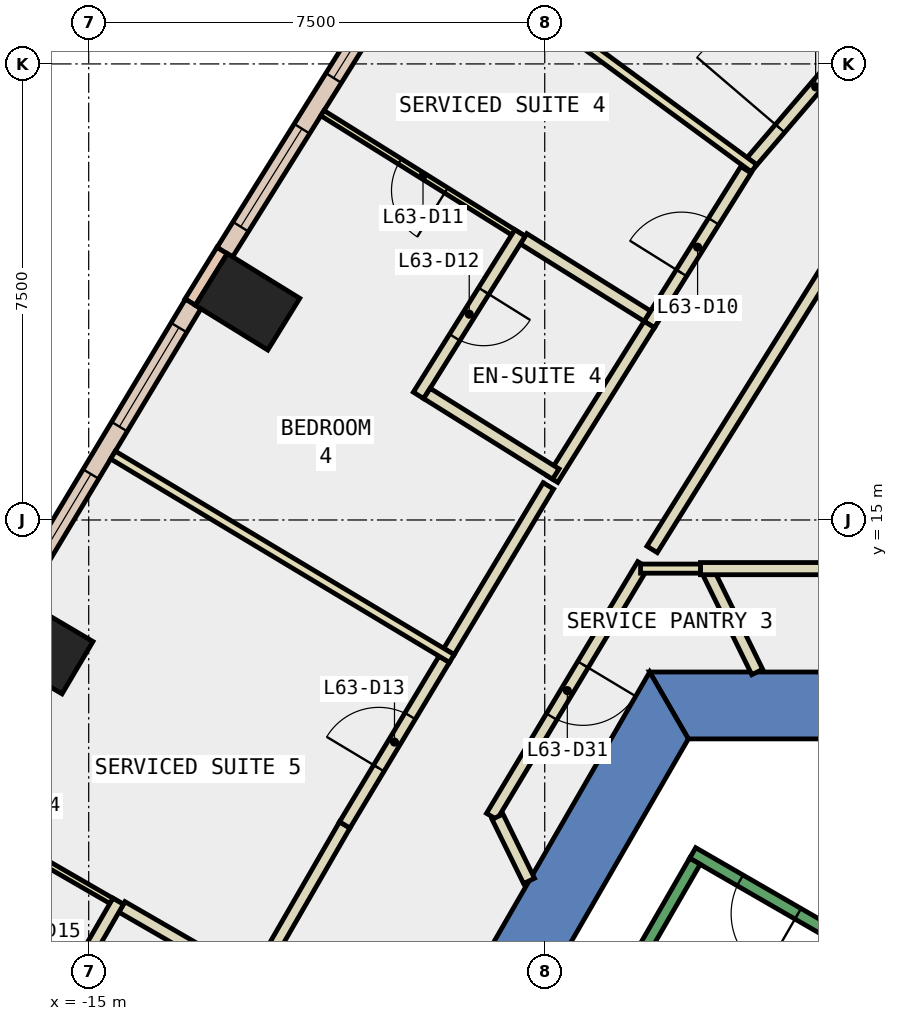
"""IFC4 building model, lengths in metres.
Left out: names, types, materials, properties, quantities, classifications, styles, units other than length and angle.
Written with IfcOpenShell. Run it as: python <this file> out.ifc"""

import sys

from ifc_helpers import new_model, si_unit, direction, frame, frame_2d, origin, origin_2d, place, context, subcontext, project, spatial, polyline, rectangle, outline, extrude, element, fill, save


model = new_model("IFC4")
c1 = context("Model", 3, precision=1e-05, world=origin(), true_north=direction((0.0, 1.0)))
c2 = subcontext(c1, "Body", "Model", "MODEL_VIEW")
j1 = project(units=[si_unit("LENGTHUNIT", "METRE"), si_unit("PLANEANGLEUNIT", "RADIAN")], contexts=[c1])
p1 = place(None, origin())
s1 = spatial("IfcSite", under=j1, at=p1, CompositionType="ELEMENT")
p2 = place(p1, origin())
s2 = spatial("IfcBuilding", under=s1, at=p2, CompositionType="ELEMENT")
p3 = place(p2, frame((0.0, 0.0, 273.8)))
s3 = spatial("IfcBuildingStorey", under=s2, at=p3, CompositionType="ELEMENT", Elevation=273.8)
for number, where, z_axis, x_axis in (
    (1, (-12.387, 18.588, -0.34), (0.0, 0.0, 1.0), (0.526, 0.851, 0.0)),
    (2, (-15.787, 12.927, -0.34), (0.0, 0.0, 1.0), (0.509, 0.861, 0.0)),
):
    element("IfcColumn", number, at=place(p3, frame(where, z_axis=z_axis, x_axis=x_axis)), inside=s3, PredefinedType="COLUMN", context=c2, shape_type="SweptSolid", body=[
        extrude(rectangle(XDim=1.0, YDim=1.4, at=origin_2d()), origin(), (0.0, 0.0, 1.0), 3.6),
    ])
p4 = place(p3, frame((0.0, 0.0, -0.34)))
e3 = element("IfcWall", 3, at=p4, inside=s3, PredefinedType="SHEAR", context=c2, shape_type="SweptSolid", body=[
    extrude(outline(polyline([(5.774, 12.5), (-5.774, 12.5), (-5.138, 11.4), (5.138, 11.4), (5.774, 12.5)])), origin(), (0.0, 0.0, 1.0), 3.6),
])
p5 = place(p3, frame((0.0, 0.0, -0.34)))
e4 = element("IfcWall", 4, at=p5, inside=s3, PredefinedType="SHEAR", context=c2, shape_type="SweptSolid", body=[
    extrude(outline(polyline([(-10.535, 4.253), (-9.583, 3.703), (-5.138, 11.4), (-5.774, 12.5), (-10.535, 4.253)])), origin(), (0.0, 0.0, 1.0), 3.6),
])
p6 = place(p3, frame((-12.805, 19.434, 0.0), z_axis=(0.0, 0.0, 1.0), x_axis=(-0.525825307325, -0.850592585306, 0.0)))
e5 = element("IfcWall", 5, at=p6, inside=s3, PredefinedType="STANDARD", context=c2, shape_type="SweptSolid", body=[
    extrude(rectangle(XDim=1.0, YDim=0.2, at=frame_2d((0.5, 0.0))), origin(), (0.0, 0.0, 1.0), 3.26),
])
p7 = place(p3, frame((-9.704, 24.297, 0.0), z_axis=(0.0, 0.0, 1.0), x_axis=(-0.529915244244, -0.848050608111, 0.0)))
e6 = element("IfcWall", 6, at=p7, inside=s3, PredefinedType="STANDARD", context=c2, shape_type="SweptSolid", body=[
    extrude(rectangle(XDim=5.769, YDim=0.3, at=frame_2d((2.884, 0.0))), origin(), (0.0, 0.0, 1.0), 3.26),
])
p8 = place(p7, frame((0.492, 0.0, 0.9)))
e7 = element("IfcOpeningElement", 7, at=p8, cuts=e6, PredefinedType="OPENING", context=c2, shape_type="SweptSolid", body=[
    extrude(rectangle(XDim=1.9, YDim=2.0, at=frame_2d((0.95, 1.0))), frame((0.0, 0.16, 0.0), z_axis=(0.0, -1.0, 0.0), x_axis=(1.0, 0.0, 0.0)), (0.0, 0.0, 1.0), 0.32),
])
p9 = place(p7, frame((3.376, 0.0, 0.9)))
e8 = element("IfcOpeningElement", 8, at=p9, cuts=e6, PredefinedType="OPENING", context=c2, shape_type="SweptSolid", body=[
    extrude(rectangle(XDim=1.9, YDim=2.0, at=frame_2d((0.95, 1.0))), frame((0.0, 0.16, 0.0), z_axis=(0.0, -1.0, 0.0), x_axis=(1.0, 0.0, 0.0)), (0.0, 0.0, 1.0), 0.32),
])
p10 = place(p3, frame((-13.282, 18.554, 0.0), z_axis=(0.0, 0.0, 1.0), x_axis=(-0.515006791362, -0.857186096977, 0.0)))
e9 = element("IfcWall", 9, at=p10, inside=s3, PredefinedType="STANDARD", context=c2, shape_type="SweptSolid", body=[
    extrude(rectangle(XDim=5.619, YDim=0.3, at=frame_2d((2.81, 0.0))), origin(), (0.0, 0.0, 1.0), 3.26),
])
p11 = place(p10, frame((0.455, 0.0, 0.9)))
e10 = element("IfcOpeningElement", 10, at=p11, cuts=e9, PredefinedType="OPENING", context=c2, shape_type="SweptSolid", body=[
    extrude(rectangle(XDim=1.9, YDim=2.0, at=frame_2d((0.95, 1.0))), frame((0.0, 0.16, 0.0), z_axis=(0.0, -1.0, 0.0), x_axis=(1.0, 0.0, 0.0)), (0.0, 0.0, 1.0), 0.32),
])
p12 = place(p10, frame((3.265, 0.0, 0.9)))
e11 = element("IfcOpeningElement", 11, at=p12, cuts=e9, PredefinedType="OPENING", context=c2, shape_type="SweptSolid", body=[
    extrude(rectangle(XDim=1.9, YDim=2.0, at=frame_2d((0.95, 1.0))), frame((0.0, 0.16, 0.0), z_axis=(0.0, -1.0, 0.0), x_axis=(1.0, 0.0, 0.0)), (0.0, 0.0, 1.0), 0.32),
])
p13 = place(p3, frame((-4.005, 12.5, 0.0), z_axis=(0.0, 0.0, 1.0), x_axis=(-0.440355460167, 0.89782351757, 0.0)))
e12 = element("IfcWall", 12, at=p13, inside=s3, PredefinedType="PARTITIONING", context=c2, shape_type="SweptSolid", body=[
    extrude(rectangle(XDim=1.869, YDim=0.2, at=frame_2d((0.935, 0.0))), origin(), (0.0, 0.0, 1.0), 3.26),
])
p14 = place(p3, frame((-5.885, 14.264, 0.0), z_axis=(0.0, 0.0, 1.0), x_axis=(-0.514971458129, -0.857207324579, 0.0)))
e13 = element("IfcWall", 13, at=p14, inside=s3, PredefinedType="PARTITIONING", context=c2, shape_type="SweptSolid", body=[
    extrude(rectangle(XDim=4.83, YDim=0.2, at=frame_2d((2.415, 0.0))), origin(), (0.0, 0.0, 1.0), 3.26),
])
p15 = place(p14, frame((1.915, 0.0, 0.0)))
e14 = element("IfcOpeningElement", 14, at=p15, cuts=e13, PredefinedType="OPENING", context=c2, shape_type="SweptSolid", body=[
    extrude(rectangle(XDim=1.0, YDim=2.1, at=frame_2d((0.5, 1.05))), frame((0.0, 0.11, 0.0), z_axis=(0.0, -1.0, 0.0), x_axis=(1.0, 0.0, 0.0)), (0.0, 0.0, 1.0), 0.22),
])
p16 = place(p3, frame((-8.276, 10.12, 0.0), z_axis=(0.0, 0.0, 1.0), x_axis=(0.440226122236, -0.897886942382, 0.0)))
e15 = element("IfcWall", 15, at=p16, inside=s3, PredefinedType="PARTITIONING", context=c2, shape_type="SweptSolid", body=[
    extrude(rectangle(XDim=1.176, YDim=0.2, at=frame_2d((0.588, 0.0))), origin(), (0.0, 0.0, 1.0), 3.26),
])
p17 = place(p3, frame((-4.939, 14.2, 0.0), z_axis=(0.0, 0.0, 1.0), x_axis=(1.0, 0.0, 0.0)))
e16 = element("IfcWall", 16, at=p17, inside=s3, PredefinedType="PARTITIONING", context=c2, shape_type="SweptSolid", body=[
    extrude(rectangle(XDim=4.539, YDim=0.2, at=frame_2d((2.27, 0.0))), origin(), (0.0, 0.0, 1.0), 3.26),
])
p18 = place(p3, frame((-2.469, 19.742, 0.0), z_axis=(0.0, 0.0, 1.0), x_axis=(-0.529852912827, -0.848089553508, 0.0)))
e17 = element("IfcWall", 17, at=p18, inside=s3, PredefinedType="PARTITIONING", context=c2, shape_type="SweptSolid", body=[
    extrude(rectangle(XDim=6.162, YDim=0.2, at=frame_2d((3.081, 0.0))), origin(), (0.0, 0.0, 1.0), 3.26),
])
p19 = place(p3, frame((-4.155, 20.825, 0.0), z_axis=(0.0, 0.0, 1.0), x_axis=(0.650396970678, 0.75959448427, 0.0)))
e18 = element("IfcWall", 18, at=p19, inside=s3, PredefinedType="PARTITIONING", context=c2, shape_type="SweptSolid", body=[
    extrude(rectangle(XDim=3.416, YDim=0.2, at=frame_2d((1.708, 0.0))), origin(), (0.0, 0.0, 1.0), 3.26),
])
p20 = place(p19, frame((0.808, 0.0, 0.0)))
e19 = element("IfcOpeningElement", 19, at=p20, cuts=e18, PredefinedType="OPENING", context=c2, shape_type="SweptSolid", body=[
    extrude(rectangle(XDim=1.8, YDim=2.1, at=frame_2d((0.9, 1.05))), frame((0.0, 0.11, 0.0), z_axis=(0.0, -1.0, 0.0), x_axis=(1.0, 0.0, 0.0)), (0.0, 0.0, 1.0), 0.22),
])
p21 = place(p3, frame((-5.781, 18.215, 0.0), z_axis=(0.0, 0.0, 1.0), x_axis=(0.530028199927, 0.847980015851, 0.0)))
e20 = element("IfcWall", 20, at=p21, inside=s3, PredefinedType="PARTITIONING", context=c2, shape_type="SweptSolid", body=[
    extrude(rectangle(XDim=3.0, YDim=0.2, at=frame_2d((1.5, 0.0))), origin(), (0.0, 0.0, 1.0), 3.26),
])
p22 = place(p21, frame((1.0, 0.0, 0.0)))
e21 = element("IfcOpeningElement", 21, at=p22, cuts=e20, PredefinedType="OPENING", context=c2, shape_type="SweptSolid", body=[
    extrude(rectangle(XDim=1.0, YDim=2.1, at=frame_2d((0.5, 1.05))), frame((0.0, 0.11, 0.0), z_axis=(0.0, -1.0, 0.0), x_axis=(1.0, 0.0, 0.0)), (0.0, 0.0, 1.0), 0.22),
])
p23 = place(p3, frame((-9.075, 12.837, 0.0), z_axis=(0.0, 0.0, 1.0), x_axis=(0.514620055475, 0.857418333431, 0.0)))
e22 = element("IfcWall", 22, at=p23, inside=s3, PredefinedType="PARTITIONING", context=c2, shape_type="SweptSolid", body=[
    extrude(rectangle(XDim=3.177, YDim=0.2, at=frame_2d((1.588, 0.0))), origin(), (0.0, 0.0, 1.0), 3.26),
])
p24 = place(p3, frame((-7.371, 15.671, 0.0), z_axis=(0.0, 0.0, 1.0), x_axis=(0.529991625428, 0.84800287557, 0.0)))
e23 = element("IfcWall", 23, at=p24, inside=s3, PredefinedType="PARTITIONING", context=c2, shape_type="SweptSolid", body=[
    extrude(rectangle(XDim=3.0, YDim=0.2, at=frame_2d((1.5, 0.0))), origin(), (0.0, 0.0, 1.0), 3.26),
])
p25 = place(p3, frame((-12.338, 7.3, 0.0), z_axis=(0.0, 0.0, 1.0), x_axis=(0.4996633593, 0.866219676164, 0.0)))
e24 = element("IfcWall", 24, at=p25, inside=s3, PredefinedType="PARTITIONING", context=c2, shape_type="SweptSolid", body=[
    extrude(rectangle(XDim=3.1, YDim=0.2, at=frame_2d((1.55, 0.0))), origin(), (0.0, 0.0, 1.0), 3.26),
])
p26 = place(p3, frame((-10.789, 9.985, 0.0), z_axis=(0.0, 0.0, 1.0), x_axis=(0.51487988517, 0.857262330823, 0.0)))
e25 = element("IfcWall", 25, at=p26, inside=s3, PredefinedType="PARTITIONING", context=c2, shape_type="SweptSolid", body=[
    extrude(rectangle(XDim=3.177, YDim=0.2, at=frame_2d((1.589, 0.0))), origin(), (0.0, 0.0, 1.0), 3.26),
])
p27 = place(p26, frame((1.089, 0.0, 0.0)))
e26 = element("IfcOpeningElement", 26, at=p27, cuts=e25, PredefinedType="OPENING", context=c2, shape_type="SweptSolid", body=[
    extrude(rectangle(XDim=1.0, YDim=2.1, at=frame_2d((0.5, 1.05))), frame((0.0, 0.11, 0.0), z_axis=(0.0, -1.0, 0.0), x_axis=(1.0, 0.0, 0.0)), (0.0, 0.0, 1.0), 0.22),
])
p28 = place(p3, frame((-4.939, 14.2, 0.0), z_axis=(0.0, 0.0, 1.0), x_axis=(-1.0, 0.0, 0.0)))
e27 = element("IfcWall", 27, at=p28, inside=s3, PredefinedType="PARTITIONING", context=c2, shape_type="SweptSolid", body=[
    extrude(rectangle(XDim=0.985, YDim=0.15, at=frame_2d((0.493, 0.0))), origin(), (0.0, 0.0, 1.0), 3.26),
])
p29 = place(p3, frame((-4.058, 20.785, 0.0), z_axis=(0.0, 0.0, 1.0), x_axis=(-0.805947688418, 0.591986759593, 0.0)))
e28 = element("IfcWall", 28, at=p29, inside=s3, PredefinedType="PARTITIONING", context=c2, shape_type="SweptSolid", body=[
    extrude(rectangle(XDim=5.196, YDim=0.15, at=frame_2d((2.598, 0.0))), origin(), (0.0, 0.0, 1.0), 3.26),
])
p30 = place(p3, frame((-7.848, 19.625, 0.0), z_axis=(0.0, 0.0, 1.0), x_axis=(-0.848188150314, 0.529695064794, 0.0)))
e29 = element("IfcWall", 29, at=p30, inside=s3, PredefinedType="PARTITIONING", context=c2, shape_type="SweptSolid", body=[
    extrude(rectangle(XDim=3.9, YDim=0.1, at=frame_2d((1.95, 0.0))), origin(), (0.0, 0.0, 1.0), 3.26),
])
p31 = place(p30, frame((1.5, 0.0, 0.0)))
e30 = element("IfcOpeningElement", 30, at=p31, cuts=e29, PredefinedType="OPENING", context=c2, shape_type="SweptSolid", body=[
    extrude(rectangle(XDim=0.9, YDim=2.1, at=frame_2d((0.45, 1.05))), frame((0.0, 0.06, 0.0), z_axis=(0.0, -1.0, 0.0), x_axis=(1.0, 0.0, 0.0)), (0.0, 0.0, 1.0), 0.12),
])
p32 = place(p3, frame((-5.813, 18.353, 0.0), z_axis=(0.0, 0.0, 1.0), x_axis=(-0.847969725239, 0.530044663287, 0.0)))
e31 = element("IfcWall", 31, at=p32, inside=s3, PredefinedType="PARTITIONING", context=c2, shape_type="SweptSolid", body=[
    extrude(rectangle(XDim=2.4, YDim=0.2, at=frame_2d((1.2, 0.0))), origin(), (0.0, 0.0, 1.0), 3.26),
])
p33 = place(p3, frame((-7.907, 19.72, 0.0), z_axis=(0.0, 0.0, 1.0), x_axis=(-0.529915322147, -0.848050559433, 0.0)))
e32 = element("IfcWall", 32, at=p33, inside=s3, PredefinedType="PARTITIONING", context=c2, shape_type="SweptSolid", body=[
    extrude(rectangle(XDim=3.149, YDim=0.2, at=frame_2d((1.575, 0.0))), origin(), (0.0, 0.0, 1.0), 3.26),
])
p34 = place(p33, frame((1.125, 0.0, 0.0)))
e33 = element("IfcOpeningElement", 33, at=p34, cuts=e32, PredefinedType="OPENING", context=c2, shape_type="SweptSolid", body=[
    extrude(rectangle(XDim=0.9, YDim=2.1, at=frame_2d((0.45, 1.05))), frame((0.0, 0.11, 0.0), z_axis=(0.0, -1.0, 0.0), x_axis=(1.0, 0.0, 0.0)), (0.0, 0.0, 1.0), 0.22),
])
p35 = place(p3, frame((-9.438, 17.081, 0.0), z_axis=(0.0, 0.0, 1.0), x_axis=(0.847992817371, -0.530007718516, 0.0)))
e34 = element("IfcWall", 34, at=p35, inside=s3, PredefinedType="PARTITIONING", context=c2, shape_type="SweptSolid", body=[
    extrude(rectangle(XDim=2.5, YDim=0.2, at=frame_2d((1.25, 0.0))), origin(), (0.0, 0.0, 1.0), 3.26),
])
p36 = place(p3, frame((-9.028, 12.722, 0.0), z_axis=(0.0, 0.0, 1.0), x_axis=(-0.857330501016, 0.514766366449, 0.0)))
e35 = element("IfcWall", 35, at=p36, inside=s3, PredefinedType="PARTITIONING", context=c2, shape_type="SweptSolid", body=[
    extrude(rectangle(XDim=6.5, YDim=0.15, at=frame_2d((3.25, 0.0))), origin(), (0.0, 0.0, 1.0), 3.26),
])
p37 = place(p3, frame((-14.454, 8.637, 0.0), z_axis=(0.0, 0.0, 1.0), x_axis=(-0.865995823051, 0.500051231833, 0.0)))
e36 = element("IfcWall", 36, at=p37, inside=s3, PredefinedType="PARTITIONING", context=c2, shape_type="SweptSolid", body=[
    extrude(rectangle(XDim=3.899, YDim=0.1, at=frame_2d((1.95, 0.0))), origin(), (0.0, 0.0, 1.0), 3.26),
])
p38 = place(p37, frame((1.5, 0.0, 0.0)))
e37 = element("IfcOpeningElement", 37, at=p38, cuts=e36, PredefinedType="OPENING", context=c2, shape_type="SweptSolid", body=[
    extrude(rectangle(XDim=0.9, YDim=2.1, at=frame_2d((0.45, 1.05))), frame((0.0, 0.06, 0.0), z_axis=(0.0, -1.0, 0.0), x_axis=(1.0, 0.0, 0.0)), (0.0, 0.0, 1.0), 0.12),
])
p39 = place(p3, frame((-12.375, 7.437, 0.0), z_axis=(0.0, 0.0, 1.0), x_axis=(-0.866100915363, 0.499869187296, 0.0)))
e38 = element("IfcWall", 38, at=p39, inside=s3, PredefinedType="PARTITIONING", context=c2, shape_type="SweptSolid", body=[
    extrude(rectangle(XDim=2.401, YDim=0.2, at=frame_2d((1.2, 0.0))), origin(), (0.0, 0.0, 1.0), 3.26),
])
p40 = place(p3, frame((-14.515, 8.73, 0.0), z_axis=(0.0, 0.0, 1.0), x_axis=(-0.500039995618, -0.866002311072, 0.0)))
e39 = element("IfcWall", 39, at=p40, inside=s3, PredefinedType="PARTITIONING", context=c2, shape_type="SweptSolid", body=[
    extrude(rectangle(XDim=3.15, YDim=0.2, at=frame_2d((1.575, 0.0))), origin(), (0.0, 0.0, 1.0), 3.26),
])
p41 = place(p40, frame((1.125, 0.0, 0.0)))
e40 = element("IfcOpeningElement", 40, at=p41, cuts=e39, PredefinedType="OPENING", context=c2, shape_type="SweptSolid", body=[
    extrude(rectangle(XDim=0.9, YDim=2.1, at=frame_2d((0.45, 1.05))), frame((0.0, 0.11, 0.0), z_axis=(0.0, -1.0, 0.0), x_axis=(1.0, 0.0, 0.0)), (0.0, 0.0, 1.0), 0.22),
])
p42 = place(p3, frame((-1.256, 7.324, 0.0), z_axis=(0.0, 0.0, 1.0), x_axis=(-0.866046073146, 0.499964197906, 0.0)))
e41 = element("IfcWall", 41, at=p42, inside=s3, PredefinedType="STANDARD", context=c2, shape_type="SweptSolid", body=[
    extrude(rectangle(XDim=4.4, YDim=0.2, at=frame_2d((2.2, 0.0))), origin(), (0.0, 0.0, 1.0), 3.26),
])
p43 = place(p42, frame((2.4, 0.0, 0.0)))
e42 = element("IfcOpeningElement", 42, at=p43, cuts=e41, PredefinedType="OPENING", context=c2, shape_type="SweptSolid", body=[
    extrude(rectangle(XDim=1.1, YDim=2.2, at=frame_2d((0.55, 1.1))), frame((0.0, 0.11, 0.0), z_axis=(0.0, -1.0, 0.0), x_axis=(1.0, 0.0, 0.0)), (0.0, 0.0, 1.0), 0.22),
])
p44 = place(p3, frame((-5.03, 9.388, 0.0), z_axis=(0.0, 0.0, 1.0), x_axis=(-0.499978703459, -0.866037698999, 0.0)))
e43 = element("IfcWall", 43, at=p44, inside=s3, PredefinedType="STANDARD", context=c2, shape_type="SweptSolid", body=[
    extrude(rectangle(XDim=6.9, YDim=0.2, at=frame_2d((3.45, 0.0))), origin(), (0.0, 0.0, 1.0), 3.26),
])
p45 = place(p8, origin())
e44 = element("IfcWindow", 44, at=p45, inside=s3, PartitioningType="SINGLE_PANEL", PredefinedType="WINDOW", context=c2, shape_type="SweptSolid", body=[
    extrude(rectangle(XDim=1.9, YDim=2.0, at=frame_2d((0.95, 1.0))), frame((0.0, 0.03, 0.0), z_axis=(0.0, -1.0, 0.0), x_axis=(1.0, 0.0, 0.0)), (0.0, 0.0, 1.0), 0.06),
])
fill(e7, e44)
p46 = place(p9, origin())
e45 = element("IfcWindow", 45, at=p46, inside=s3, PartitioningType="SINGLE_PANEL", PredefinedType="WINDOW", context=c2, shape_type="SweptSolid", body=[
    extrude(rectangle(XDim=1.9, YDim=2.0, at=frame_2d((0.95, 1.0))), frame((0.0, 0.03, 0.0), z_axis=(0.0, -1.0, 0.0), x_axis=(1.0, 0.0, 0.0)), (0.0, 0.0, 1.0), 0.06),
])
fill(e8, e45)
p47 = place(p11, origin())
e46 = element("IfcWindow", 46, at=p47, inside=s3, PartitioningType="SINGLE_PANEL", PredefinedType="WINDOW", context=c2, shape_type="SweptSolid", body=[
    extrude(rectangle(XDim=1.9, YDim=2.0, at=frame_2d((0.95, 1.0))), frame((0.0, 0.03, 0.0), z_axis=(0.0, -1.0, 0.0), x_axis=(1.0, 0.0, 0.0)), (0.0, 0.0, 1.0), 0.06),
])
fill(e10, e46)
p48 = place(p12, origin())
e47 = element("IfcWindow", 47, at=p48, inside=s3, PartitioningType="SINGLE_PANEL", PredefinedType="WINDOW", context=c2, shape_type="SweptSolid", body=[
    extrude(rectangle(XDim=1.9, YDim=2.0, at=frame_2d((0.95, 1.0))), frame((0.0, 0.03, 0.0), z_axis=(0.0, -1.0, 0.0), x_axis=(1.0, 0.0, 0.0)), (0.0, 0.0, 1.0), 0.06),
])
fill(e11, e47)
p49 = place(p22, origin())
e48 = element("IfcDoor", 48, at=p49, inside=s3, OperationType="SINGLE_SWING_RIGHT", PredefinedType="DOOR", context=c2, shape_type="SweptSolid", body=[
    extrude(rectangle(XDim=1.0, YDim=2.1, at=frame_2d((0.5, 1.05))), frame((0.0, 0.025, 0.0), z_axis=(0.0, -1.0, 0.0), x_axis=(1.0, 0.0, 0.0)), (0.0, 0.0, 1.0), 0.05),
])
fill(e21, e48)
p50 = place(p31, origin())
e49 = element("IfcDoor", 49, at=p50, inside=s3, OperationType="SINGLE_SWING_RIGHT", PredefinedType="DOOR", context=c2, shape_type="SweptSolid", body=[
    extrude(rectangle(XDim=0.9, YDim=2.1, at=frame_2d((0.45, 1.05))), frame((0.0, 0.025, 0.0), z_axis=(0.0, -1.0, 0.0), x_axis=(1.0, 0.0, 0.0)), (0.0, 0.0, 1.0), 0.05),
])
fill(e30, e49)
p51 = place(p34, origin())
e50 = element("IfcDoor", 50, at=p51, inside=s3, OperationType="SINGLE_SWING_LEFT", PredefinedType="DOOR", context=c2, shape_type="SweptSolid", body=[
    extrude(rectangle(XDim=0.9, YDim=2.1, at=frame_2d((0.45, 1.05))), frame((0.0, 0.025, 0.0), z_axis=(0.0, -1.0, 0.0), x_axis=(1.0, 0.0, 0.0)), (0.0, 0.0, 1.0), 0.05),
])
fill(e33, e50)
p52 = place(p27, origin())
e51 = element("IfcDoor", 51, at=p52, inside=s3, OperationType="SINGLE_SWING_RIGHT", PredefinedType="DOOR", context=c2, shape_type="SweptSolid", body=[
    extrude(rectangle(XDim=1.0, YDim=2.1, at=frame_2d((0.5, 1.05))), frame((0.0, 0.025, 0.0), z_axis=(0.0, -1.0, 0.0), x_axis=(1.0, 0.0, 0.0)), (0.0, 0.0, 1.0), 0.05),
])
fill(e26, e51)
p53 = place(p20, origin())
e52 = element("IfcDoor", 52, at=p53, inside=s3, OperationType="DOUBLE_DOOR_SINGLE_SWING", PredefinedType="DOOR", context=c2, shape_type="SweptSolid", body=[
    extrude(rectangle(XDim=1.8, YDim=2.1, at=frame_2d((0.9, 1.05))), frame((0.0, 0.025, 0.0), z_axis=(0.0, -1.0, 0.0), x_axis=(1.0, 0.0, 0.0)), (0.0, 0.0, 1.0), 0.05),
])
fill(e19, e52)
p54 = place(p15, origin())
e53 = element("IfcDoor", 53, at=p54, inside=s3, OperationType="SINGLE_SWING_LEFT", PredefinedType="DOOR", context=c2, shape_type="SweptSolid", body=[
    extrude(rectangle(XDim=1.0, YDim=2.1, at=frame_2d((0.5, 1.05))), frame((0.0, 0.025, 0.0), z_axis=(0.0, -1.0, 0.0), x_axis=(1.0, 0.0, 0.0)), (0.0, 0.0, 1.0), 0.05),
])
fill(e14, e53)
p55 = place(p43, origin())
e54 = element("IfcDoor", 54, at=p55, inside=s3, OperationType="SINGLE_SWING_LEFT", PredefinedType="DOOR", context=c2, shape_type="SweptSolid", body=[
    extrude(rectangle(XDim=1.1, YDim=2.2, at=frame_2d((0.55, 1.1))), frame((0.0, 0.025, 0.0), z_axis=(0.0, -1.0, 0.0), x_axis=(1.0, 0.0, 0.0)), (0.0, 0.0, 1.0), 0.05),
])
fill(e42, e54)
save(model, sys.argv[1])
